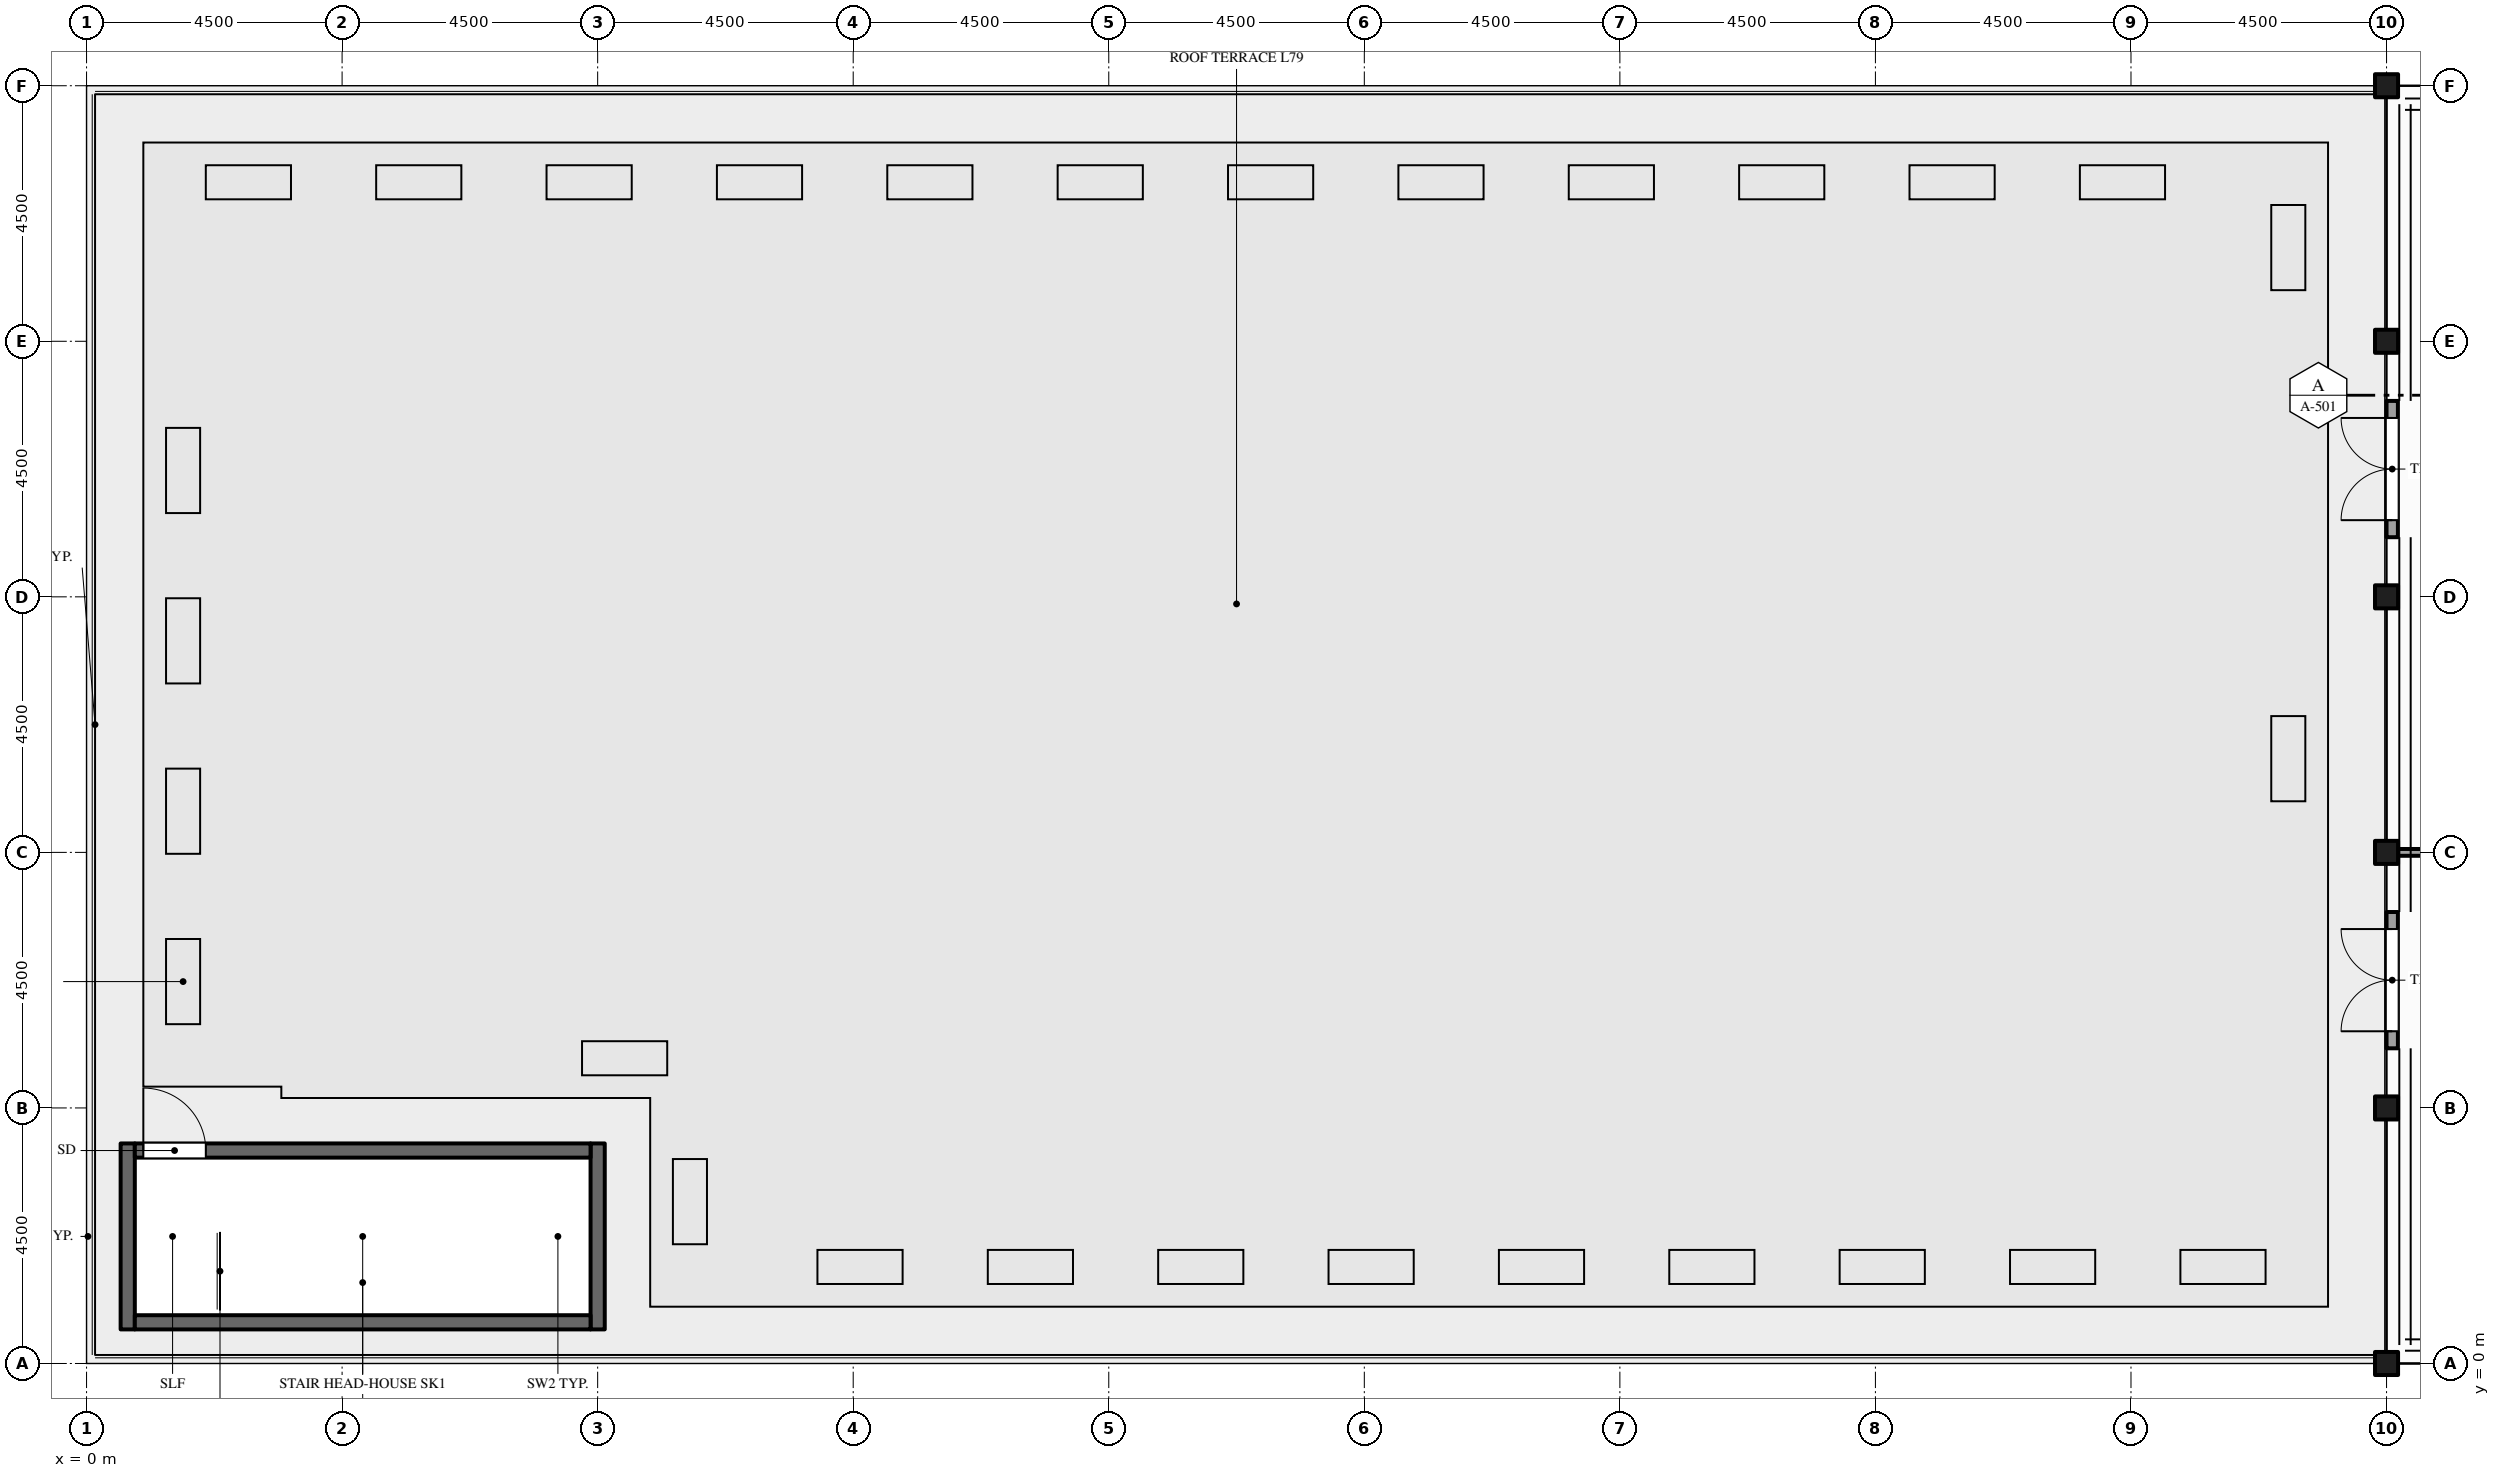
"""IFC4 building model, lengths in metres.
Left out: names, types, materials, properties, quantities, classifications, styles, units other than length and angle.
Written with IfcOpenShell. Run it as: python <this file> out.ifc"""

import sys

from ifc_helpers import new_model, si_unit, direction, frame, frame_2d, origin, place, context, subcontext, project, spatial, rectangle, extrude, element, fill, save


model = new_model("IFC4")
c1 = context("Model", 3, precision=1e-05, world=origin(), true_north=direction((0.0, 1.0)))
c2 = subcontext(c1, "Body", "Model", "MODEL_VIEW")
j1 = project(units=[si_unit("LENGTHUNIT", "METRE"), si_unit("PLANEANGLEUNIT", "RADIAN")], contexts=[c1])
p1 = place(None, origin())
s1 = spatial("IfcSite", under=j1, at=p1, CompositionType="ELEMENT")
p2 = place(p1, origin())
s2 = spatial("IfcBuilding", under=s1, at=p2, CompositionType="ELEMENT")
p3 = place(p2, frame((0.0, 0.0, 345.5)))
s3 = spatial("IfcBuildingStorey", under=s2, at=p3, CompositionType="ELEMENT", Elevation=345.5)
p4 = place(p3, frame((40.6, 5.55, 0.0), z_axis=(0.0, 0.0, 1.0), x_axis=(0.0, 1.0, 0.0)))
e1 = element("IfcWall", 1, at=p4, inside=s3, PredefinedType="STANDARD", context=c2, shape_type="SweptSolid", body=[
    extrude(rectangle(XDim=2.4, YDim=0.2, at=frame_2d((1.2, 0.0))), origin(), (0.0, 0.0, 1.0), 4.302),
])
p5 = place(p4, frame((0.3, 0.0, 0.0)))
e2 = element("IfcOpeningElement", 2, at=p5, cuts=e1, PredefinedType="OPENING", context=c2, shape_type="SweptSolid", body=[
    extrude(rectangle(XDim=1.8, YDim=2.4, at=frame_2d((0.9, 1.2))), frame((0.0, 0.11, 0.0), z_axis=(0.0, -1.0, 0.0), x_axis=(1.0, 0.0, 0.0)), (0.0, 0.0, 1.0), 0.22),
])
p6 = place(p3, frame((40.6, 14.55, 0.0), z_axis=(0.0, 0.0, 1.0), x_axis=(0.0, 1.0, 0.0)))
e3 = element("IfcWall", 3, at=p6, inside=s3, PredefinedType="STANDARD", context=c2, shape_type="SweptSolid", body=[
    extrude(rectangle(XDim=2.4, YDim=0.2, at=frame_2d((1.2, 0.0))), origin(), (0.0, 0.0, 1.0), 4.302),
])
p7 = place(p6, frame((0.3, 0.0, 0.0)))
e4 = element("IfcOpeningElement", 4, at=p7, cuts=e3, PredefinedType="OPENING", context=c2, shape_type="SweptSolid", body=[
    extrude(rectangle(XDim=1.8, YDim=2.4, at=frame_2d((0.9, 1.2))), frame((0.0, 0.11, 0.0), z_axis=(0.0, -1.0, 0.0), x_axis=(1.0, 0.0, 0.0)), (0.0, 0.0, 1.0), 0.22),
])
for number, where, z_axis, x_axis in (
    (5, (0.725, 0.6, 0.0), (0.0, 0.0, 1.0), (0.0, 1.0, 0.0)),
    (6, (9.0, 0.6, 0.0), (0.0, 0.0, 1.0), (0.0, 1.0, 0.0)),
):
    element("IfcWall", number, at=place(p3, frame(where, z_axis=z_axis, x_axis=x_axis)), inside=s3, PredefinedType="SHEAR", context=c2, shape_type="SweptSolid", body=[
        extrude(rectangle(XDim=3.275, YDim=0.25, at=frame_2d((1.637, 0.0))), origin(), (0.0, 0.0, 1.0), 3.5),
    ])
p8 = place(p3, frame((0.85, 0.725, 0.0), z_axis=(0.0, 0.0, 1.0), x_axis=(1.0, 0.0, 0.0)))
e7 = element("IfcWall", 7, at=p8, inside=s3, PredefinedType="SHEAR", context=c2, shape_type="SweptSolid", body=[
    extrude(rectangle(XDim=8.025, YDim=0.25, at=frame_2d((4.012, 0.0))), origin(), (0.0, 0.0, 1.0), 3.5),
])
p9 = place(p3, frame((0.85, 3.75, 0.0), z_axis=(0.0, 0.0, 1.0), x_axis=(1.0, 0.0, 0.0)))
e8 = element("IfcWall", 8, at=p9, inside=s3, PredefinedType="SHEAR", context=c2, shape_type="SweptSolid", body=[
    extrude(rectangle(XDim=8.025, YDim=0.25, at=frame_2d((4.012, 0.0))), origin(), (0.0, 0.0, 1.0), 3.5),
])
p10 = place(p9, frame((0.15, 0.0, 0.0)))
e9 = element("IfcOpeningElement", 9, at=p10, cuts=e8, PredefinedType="OPENING", context=c2, shape_type="SweptSolid", body=[
    extrude(rectangle(XDim=1.1, YDim=2.1, at=frame_2d((0.55, 1.05))), frame((0.0, 0.135, 0.0), z_axis=(0.0, -1.0, 0.0), x_axis=(1.0, 0.0, 0.0)), (0.0, 0.0, 1.0), 0.27),
])
p11 = place(p3, frame((40.51, 9.0, 0.0), z_axis=(0.0, 0.0, 1.0), x_axis=(1.0, 0.0, 0.0)))
e10 = element("IfcWall", 10, at=p11, inside=s3, PredefinedType="PARTITIONING", context=c2, shape_type="SweptSolid", body=[
    extrude(rectangle(XDim=4.43, YDim=0.12, at=frame_2d((2.215, 0.0))), origin(), (0.0, 0.0, 1.0), 3.809),
])
p12 = place(p11, frame((1.625, 0.0, 0.0)))
e11 = element("IfcOpeningElement", 11, at=p12, cuts=e10, PredefinedType="OPENING", context=c2, shape_type="SweptSolid", body=[
    extrude(rectangle(XDim=1.2, YDim=2.1, at=frame_2d((0.6, 1.05))), frame((0.0, 0.07, 0.0), z_axis=(0.0, -1.0, 0.0), x_axis=(1.0, 0.0, 0.0)), (0.0, 0.0, 1.0), 0.14),
])
p13 = place(p5, origin())
e12 = element("IfcDoor", 12, at=p13, inside=s3, OperationType="DOUBLE_DOOR_SINGLE_SWING", PredefinedType="DOOR", context=c2, shape_type="SweptSolid", body=[
    extrude(rectangle(XDim=1.8, YDim=2.4, at=frame_2d((0.9, 1.2))), frame((0.0, 0.025, 0.0), z_axis=(0.0, -1.0, 0.0), x_axis=(1.0, 0.0, 0.0)), (0.0, 0.0, 1.0), 0.05),
])
fill(e2, e12)
p14 = place(p7, origin())
e13 = element("IfcDoor", 13, at=p14, inside=s3, OperationType="DOUBLE_DOOR_SINGLE_SWING", PredefinedType="DOOR", context=c2, shape_type="SweptSolid", body=[
    extrude(rectangle(XDim=1.8, YDim=2.4, at=frame_2d((0.9, 1.2))), frame((0.0, 0.025, 0.0), z_axis=(0.0, -1.0, 0.0), x_axis=(1.0, 0.0, 0.0)), (0.0, 0.0, 1.0), 0.05),
])
fill(e4, e13)
p15 = place(p10, origin())
e14 = element("IfcDoor", 14, at=p15, inside=s3, OperationType="SINGLE_SWING_LEFT", PredefinedType="DOOR", context=c2, shape_type="SweptSolid", body=[
    extrude(rectangle(XDim=1.1, YDim=2.1, at=frame_2d((0.55, 1.05))), frame((0.0, 0.025, 0.0), z_axis=(0.0, -1.0, 0.0), x_axis=(1.0, 0.0, 0.0)), (0.0, 0.0, 1.0), 0.05),
])
fill(e9, e14)
save(model, sys.argv[1])
